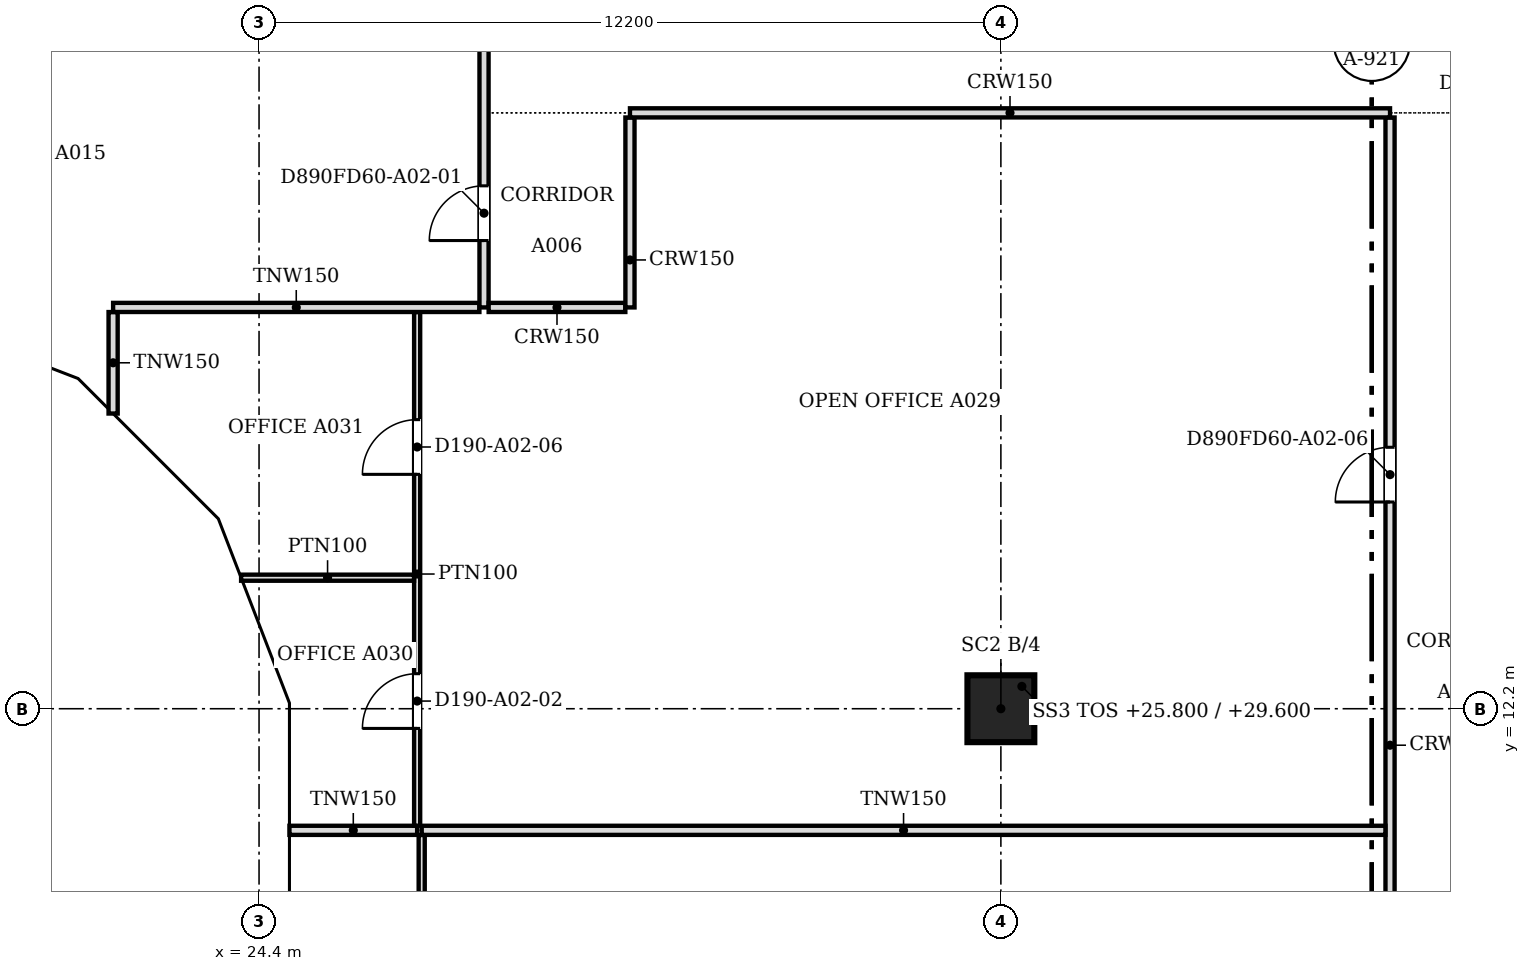
"""IFC4 building model, lengths in metres.
Left out: names, types, materials, properties, quantities, classifications, styles, units other than length and angle.
Written with IfcOpenShell. Run it as: python <this file> out.ifc"""

import sys

from ifc_helpers import new_model, si_unit, direction, frame, frame_2d, origin, origin_2d, place, context, subcontext, project, spatial, polyline, rectangle, outline, extrude, faceted_brep, source, transform, mapped, element, fill, save


model = new_model("IFC4")
c1 = context("Model", 3, precision=1e-05, world=origin(), true_north=direction((0.0, 1.0)))
c2 = subcontext(c1, "Body", "Model", "MODEL_VIEW")
j1 = project(units=[si_unit("LENGTHUNIT", "METRE"), si_unit("PLANEANGLEUNIT", "RADIAN")], contexts=[c1])
p1 = place(None, origin())
s1 = spatial("IfcSite", under=j1, at=p1, CompositionType="ELEMENT")
p2 = place(p1, origin())
s2 = spatial("IfcBuilding", under=s1, at=p2, CompositionType="ELEMENT")
p3 = place(p2, frame((0.0, 0.0, 25.8)))
s3 = spatial("IfcBuildingStorey", under=s2, at=p3, CompositionType="ELEMENT", Elevation=25.8)
p4 = place(p3, frame((36.6, 12.2, 0.0), z_axis=(0.0, 0.0, 1.0), x_axis=(1.0, 0.0, 0.0)))
e1 = element("IfcColumn", 1, at=p4, inside=s3, PredefinedType="COLUMN", context=c2, shape_type="SweptSolid", body=[
    extrude(rectangle(XDim=1.1, YDim=1.1, at=origin_2d()), origin(), (0.0, 0.0, 1.0), 3.6),
])
m1 = source(origin(), c2, "Body", "Brep", [
    faceted_brep([(3.143, -0.25, 0.064), (0.093, -0.25, 3.744), (0.093, -0.25, 0.0), (3.143, -0.25, 0.0), (0.0, 0.25, 3.743), (0.047, 0.25, 3.8), (3.196, 0.25, 0.0), (0.0, 0.25, 0.0), (0.047, 0.0, 3.8), (3.196, -0.0, 0.0)], [[[0, 1, 2, 3]], [[4, 5, 6, 7]], [[6, 5, 8, 1, 0, 9]], [[5, 4, 8]], [[7, 6, 9, 3, 2]], [[7, 2, 1, 8, 4]], [[3, 9, 0]]]),
])
p5 = place(p3, frame((18.303, 18.567, 0.0), z_axis=(0.0, 0.0, 1.0), x_axis=(0.932978940178, -0.359930961693, 0.0)))
e2 = element("IfcWall", 2, at=p5, inside=s3, PredefinedType="SOLIDWALL", context=c2, shape_type="MappedRepresentation", body=[
    mapped(m1, transform((0.0, 0.0, 0.0), scale=1.0)),
])
m2 = source(origin(), c2, "Body", "SweptSolid", [
    extrude(outline(polyline([(2.664, 0.25), (0.247, 3.167), (0.247, 0.25), (2.664, 0.25)])), frame((0.0, 0.26, 0.0), z_axis=(0.0, -1.0, 0.0), x_axis=(1.0, 0.0, 0.0)), (0.0, 0.0, 1.0), 0.52),
])
p6 = place(p5, origin())
e3 = element("IfcOpeningElement", 3, at=p6, cuts=e2, PredefinedType="OPENING", context=c2, shape_type="MappedRepresentation", body=[
    mapped(m2, transform((0.0, 0.0, 0.0), scale=1.0)),
])
m3 = source(origin(), c2, "Body", "Brep", [
    faceted_brep([(3.103, -0.25, 3.736), (0.053, -0.25, 0.064), (0.053, -0.25, 0.0), (3.103, -0.25, 0.0), (0.0, 0.25, 0.0), (3.156, 0.25, 3.8), (3.209, 0.25, 3.736), (3.209, 0.25, 0.0), (3.156, -0.0, 3.8), (0.0, 0.0, 0.0)], [[[0, 1, 2, 3]], [[4, 5, 6, 7]], [[6, 5, 8]], [[5, 4, 9, 1, 0, 8]], [[4, 7, 3, 2, 9]], [[9, 2, 1]], [[3, 7, 6, 8, 0]]]),
])
p7 = place(p3, frame((21.285, 17.417, 0.0), z_axis=(0.0, 0.0, 1.0), x_axis=(0.707106781187, -0.707106781187, 0.0)))
e4 = element("IfcWall", 4, at=p7, inside=s3, PredefinedType="SOLIDWALL", context=c2, shape_type="MappedRepresentation", body=[
    mapped(m3, transform((0.0, 0.0, 0.0), scale=1.0)),
])
m4 = source(origin(), c2, "Body", "SweptSolid", [
    extrude(outline(polyline([(2.956, 3.168), (0.533, 0.25), (2.956, 0.25), (2.956, 3.168)])), frame((0.0, 0.26, 0.0), z_axis=(0.0, -1.0, 0.0), x_axis=(1.0, 0.0, 0.0)), (0.0, 0.0, 1.0), 0.52),
])
p8 = place(p7, origin())
e5 = element("IfcOpeningElement", 5, at=p8, cuts=e4, PredefinedType="OPENING", context=c2, shape_type="MappedRepresentation", body=[
    mapped(m4, transform((0.0, 0.0, 0.0), scale=1.0)),
])
m5 = source(origin(), c2, "Body", "Brep", [
    faceted_brep([(3.156, -0.25, 0.056), (0.106, -0.25, 3.736), (0.106, -0.25, 0.0), (3.156, -0.25, 0.0), (0.0, 0.25, 3.736), (0.053, 0.25, 3.8), (3.202, 0.25, 0.0), (0.0, 0.25, 0.0), (0.053, 0.0, 3.8), (3.202, -0.0, 0.0)], [[[0, 1, 2, 3]], [[4, 5, 6, 7]], [[6, 5, 8, 1, 0, 9]], [[5, 4, 8]], [[7, 6, 9, 3, 2]], [[7, 2, 1, 8, 4]], [[3, 9, 0]]]),
])
p9 = place(p3, frame((23.497, 15.234, 0.0), z_axis=(0.0, 0.0, 1.0), x_axis=(0.359913782069, -0.932985567668, 0.0)))
e6 = element("IfcWall", 6, at=p9, inside=s3, PredefinedType="SOLIDWALL", context=c2, shape_type="MappedRepresentation", body=[
    mapped(m5, transform((0.0, 0.0, 0.0), scale=1.0)),
])
m6 = source(origin(), c2, "Body", "SweptSolid", [
    extrude(outline(polyline([(2.671, 0.25), (0.253, 3.167), (0.253, 0.25), (2.671, 0.25)])), frame((0.0, 0.26, 0.0), z_axis=(0.0, -1.0, 0.0), x_axis=(1.0, 0.0, 0.0)), (0.0, 0.0, 1.0), 0.52),
])
p10 = place(p9, origin())
e7 = element("IfcOpeningElement", 7, at=p10, cuts=e6, PredefinedType="OPENING", context=c2, shape_type="MappedRepresentation", body=[
    mapped(m6, transform((0.0, 0.0, 0.0), scale=1.0)),
])
m7 = source(origin(), c2, "Body", "Brep", [
    faceted_brep([(6.1, -0.25, 0.0), (3.096, -0.25, 3.8), (0.047, -0.25, 0.057), (0.047, -0.25, 0.0), (0.0, 0.25, 0.0), (3.096, 0.25, 3.8), (6.053, 0.25, 0.059), (6.053, 0.25, 0.0), (6.1, -0.0, 0.0), (0.0, 0.0, 0.0)], [[[0, 1, 2, 3]], [[4, 5, 6, 7]], [[6, 5, 1, 0, 8]], [[5, 4, 9, 2, 1]], [[4, 7, 8, 0, 3, 9]], [[9, 3, 2]], [[8, 7, 6]]]),
])
p11 = place(p3, frame((24.65, 12.247, 0.0), z_axis=(0.0, 0.0, 1.0), x_axis=(0.0, -1.0, 0.0)))
e8 = element("IfcWall", 8, at=p11, inside=s3, PredefinedType="SOLIDWALL", context=c2, shape_type="MappedRepresentation", body=[
    mapped(m7, transform((0.0, 0.0, 0.0), scale=1.0)),
])
m8 = source(origin(), c2, "Body", "SweptSolid", [
    extrude(outline(polyline([(5.584, 0.25), (3.094, 3.401), (0.526, 0.25), (5.584, 0.25)])), frame((0.0, 0.26, 0.0), z_axis=(0.0, -1.0, 0.0), x_axis=(1.0, 0.0, 0.0)), (0.0, 0.0, 1.0), 0.52),
])
p12 = place(p11, origin())
e9 = element("IfcOpeningElement", 9, at=p12, cuts=e8, PredefinedType="OPENING", context=c2, shape_type="MappedRepresentation", body=[
    mapped(m8, transform((0.0, 0.0, 0.0), scale=1.0)),
])
p13 = place(p2, frame((0.0, 0.0, 29.6)))
s4 = spatial("IfcBuildingStorey", under=s2, at=p13, CompositionType="ELEMENT", Elevation=29.6)
m9 = source(origin(), c2, "Body", "Brep", [
    faceted_brep([(3.096, -0.25, 7.536), (0.047, -0.25, 3.856), (0.047, -0.25, 3.744), (3.096, -0.25, 0.064), (0.0, 0.25, 3.8), (3.149, 0.25, 7.6), (3.202, 0.25, 7.536), (3.202, 0.25, 0.064), (3.149, 0.25, 0.0), (3.149, -0.0, 0.0), (3.149, -0.0, 7.6), (0.0, 0.0, 3.8)], [[[0, 1, 2, 3]], [[4, 5, 6, 7, 8]], [[8, 7, 9]], [[6, 5, 10]], [[5, 4, 11, 1, 0, 10]], [[4, 8, 9, 3, 2, 11]], [[2, 1, 11]], [[3, 9, 7, 6, 10, 0]]]),
])
p14 = place(p13, frame((18.346, 18.55, -3.8), z_axis=(0.0, 0.0, 1.0), x_axis=(0.932985567668, -0.359913782069, 0.0)))
e10 = element("IfcWall", 10, at=p14, inside=s4, PredefinedType="SOLIDWALL", context=c2, shape_type="MappedRepresentation", body=[
    mapped(m9, transform((0.0, 0.0, 0.0), scale=1.0)),
])
m10 = source(origin(), c2, "Body", "SweptSolid", [
    extrude(outline(polyline([(2.949, 6.967), (0.325, 3.8), (2.949, 0.633), (2.949, 6.967)])), frame((0.0, 0.26, 0.0), z_axis=(0.0, -1.0, 0.0), x_axis=(1.0, 0.0, 0.0)), (0.0, 0.0, 1.0), 0.52),
])
p15 = place(p14, origin())
e11 = element("IfcOpeningElement", 11, at=p15, cuts=e10, PredefinedType="OPENING", context=c2, shape_type="MappedRepresentation", body=[
    mapped(m10, transform((0.0, 0.0, 0.0), scale=1.0)),
])
m11 = source(origin(), c2, "Body", "Brep", [
    faceted_brep([(0.106, -0.25, 0.064), (3.156, -0.25, 3.736), (3.156, -0.25, 3.864), (0.106, -0.25, 7.536), (0.0, 0.25, 7.536), (0.053, 0.25, 7.6), (3.209, 0.25, 3.8), (0.053, 0.25, 0.0), (0.0, 0.25, 0.064), (3.209, -0.0, 3.8), (0.053, 0.0, 0.0), (0.053, 0.0, 7.6)], [[[0, 1, 2, 3]], [[4, 5, 6, 7, 8]], [[7, 6, 9, 1, 0, 10]], [[6, 5, 11, 3, 2, 9]], [[5, 4, 11]], [[8, 7, 10]], [[8, 10, 0, 3, 11, 4]], [[1, 9, 2]]]),
])
p16 = place(p13, frame((21.248, 17.454, -3.8), z_axis=(0.0, 0.0, 1.0), x_axis=(0.707106781187, -0.707106781187, 0.0)))
e12 = element("IfcWall", 12, at=p16, inside=s4, PredefinedType="SOLIDWALL", context=c2, shape_type="MappedRepresentation", body=[
    mapped(m11, transform((0.0, 0.0, 0.0), scale=1.0)),
])
m12 = source(origin(), c2, "Body", "SweptSolid", [
    extrude(outline(polyline([(0.253, 0.632), (2.884, 3.8), (0.253, 6.968), (0.253, 0.632)])), frame((0.0, 0.26, 0.0), z_axis=(0.0, -1.0, 0.0), x_axis=(1.0, 0.0, 0.0)), (0.0, 0.0, 1.0), 0.52),
])
p17 = place(p16, origin())
e13 = element("IfcOpeningElement", 13, at=p17, cuts=e12, PredefinedType="OPENING", context=c2, shape_type="MappedRepresentation", body=[
    mapped(m12, transform((0.0, 0.0, 0.0), scale=1.0)),
])
m13 = source(origin(), c2, "Body", "Brep", [
    faceted_brep([(3.103, -0.25, 7.544), (0.053, -0.25, 3.864), (0.053, -0.25, 3.736), (3.103, -0.25, 0.056), (0.0, 0.25, 3.8), (3.149, 0.25, 7.6), (3.196, 0.25, 7.543), (3.196, 0.25, 0.057), (3.149, 0.25, 0.0), (3.149, -0.0, 0.0), (3.149, -0.0, 7.6), (0.0, 0.0, 3.8)], [[[0, 1, 2, 3]], [[4, 5, 6, 7, 8]], [[8, 7, 9]], [[6, 5, 10]], [[5, 4, 11, 1, 0, 10]], [[4, 8, 9, 3, 2, 11]], [[2, 1, 11]], [[3, 9, 7, 6, 10, 0]]]),
])
p18 = place(p13, frame((23.517, 15.185, -3.8), z_axis=(0.0, 0.0, 1.0), x_axis=(0.359864468756, -0.933004589553, 0.0)))
e14 = element("IfcWall", 14, at=p18, inside=s4, PredefinedType="SOLIDWALL", context=c2, shape_type="MappedRepresentation", body=[
    mapped(m13, transform((0.0, 0.0, 0.0), scale=1.0)),
])
p19 = place(p18, origin())
e15 = element("IfcOpeningElement", 15, at=p19, cuts=e14, PredefinedType="OPENING", context=c2, shape_type="MappedRepresentation", body=[
    mapped(m10, transform((0.0, 0.0, 0.0), scale=1.0)),
])
m14 = source(origin(), c2, "Body", "Brep", [
    faceted_brep([(0.093, -0.25, 0.057), (3.143, -0.25, 3.8), (0.093, -0.25, 7.543), (0.0, 0.25, 7.544), (0.047, 0.25, 7.6), (3.143, 0.25, 3.8), (0.047, 0.25, 0.0), (0.0, 0.25, 0.056), (0.047, 0.0, 0.0), (0.047, 0.0, 7.6)], [[[0, 1, 2]], [[3, 4, 5, 6, 7]], [[6, 5, 1, 0, 8]], [[5, 4, 9, 2, 1]], [[4, 3, 9]], [[7, 6, 8]], [[7, 8, 0, 2, 9, 3]]]),
])
p20 = place(p13, frame((24.65, 12.293, -3.8), z_axis=(0.0, 0.0, 1.0), x_axis=(0.0, -1.0, 0.0)))
e16 = element("IfcWall", 16, at=p20, inside=s4, PredefinedType="SOLIDWALL", context=c2, shape_type="MappedRepresentation", body=[
    mapped(m14, transform((0.0, 0.0, 0.0), scale=1.0)),
])
m15 = source(origin(), c2, "Body", "SweptSolid", [
    extrude(outline(polyline([(0.247, 0.641), (2.821, 3.8), (0.247, 6.959), (0.247, 0.641)])), frame((0.0, 0.26, 0.0), z_axis=(0.0, -1.0, 0.0), x_axis=(1.0, 0.0, 0.0)), (0.0, 0.0, 1.0), 0.52),
])
p21 = place(p20, origin())
e17 = element("IfcOpeningElement", 17, at=p21, cuts=e16, PredefinedType="OPENING", context=c2, shape_type="MappedRepresentation", body=[
    mapped(m15, transform((0.0, 0.0, 0.0), scale=1.0)),
])
p22 = place(p3, frame((43.0, 0.5, 0.0), z_axis=(0.0, 0.0, 1.0), x_axis=(0.0, 1.0, 0.0)))
e18 = element("IfcWall", 18, at=p22, inside=s3, PredefinedType="PARTITIONING", context=c2, shape_type="SweptSolid", body=[
    extrude(rectangle(XDim=21.424, YDim=0.15, at=frame_2d((10.712, 0.0))), origin(), (0.0, 0.0, 1.0), 3.067),
])
m16 = source(origin(), c2, "Body", "SweptSolid", [
    extrude(rectangle(XDim=0.9, YDim=2.1, at=frame_2d((0.45, 1.05))), frame((0.0, 0.085, 0.0), z_axis=(0.0, -1.0, 0.0), x_axis=(1.0, 0.0, 0.0)), (0.0, 0.0, 1.0), 0.17),
])
p23 = place(p22, frame((6.2, 0.0, 0.0)))
e19 = element("IfcOpeningElement", 19, at=p23, cuts=e18, PredefinedType="OPENING", context=c2, shape_type="MappedRepresentation", body=[
    mapped(m16, transform((0.0, 0.0, 0.0), scale=1.0)),
])
p24 = place(p22, frame((15.1, 0.0, 0.0)))
e20 = element("IfcOpeningElement", 20, at=p24, cuts=e18, PredefinedType="OPENING", context=c2, shape_type="MappedRepresentation", body=[
    mapped(m16, transform((0.0, 0.0, 0.0), scale=1.0)),
])
p25 = place(p3, frame((27.075, 4.2, 0.0), z_axis=(0.0, 0.0, 1.0), x_axis=(0.0, 1.0, 0.0)))
e21 = element("IfcWall", 21, at=p25, inside=s3, PredefinedType="PARTITIONING", context=c2, shape_type="SweptSolid", body=[
    extrude(rectangle(XDim=5.924, YDim=0.1, at=frame_2d((2.962, 0.0))), origin(), (0.0, 0.0, 1.0), 3.067),
])
m17 = source(origin(), c2, "Body", "SweptSolid", [
    extrude(rectangle(XDim=0.9, YDim=2.1, at=frame_2d((0.45, 1.05))), frame((0.0, 0.06, 0.0), z_axis=(0.0, -1.0, 0.0), x_axis=(1.0, 0.0, 0.0)), (0.0, 0.0, 1.0), 0.12),
])
p26 = place(p25, frame((2.5, 0.0, 0.0)))
e22 = element("IfcOpeningElement", 22, at=p26, cuts=e21, PredefinedType="OPENING", context=c2, shape_type="MappedRepresentation", body=[
    mapped(m17, transform((0.0, 0.0, 0.0), scale=1.0)),
])
p27 = place(p3, frame((24.9, 10.2, 0.0), z_axis=(0.0, 0.0, 1.0), x_axis=(1.0, 0.0, 0.0)))
e23 = element("IfcWall", 23, at=p27, inside=s3, PredefinedType="PARTITIONING", context=c2, shape_type="SweptSolid", body=[
    extrude(rectangle(XDim=2.1, YDim=0.15, at=frame_2d((1.05, 0.0))), origin(), (0.0, 0.0, 1.0), 3.067),
])
p28 = place(p3, frame((27.075, 10.2, 0.0), z_axis=(0.0, 0.0, 1.0), x_axis=(1.0, 0.0, 0.0)))
e24 = element("IfcWall", 24, at=p28, inside=s3, PredefinedType="PARTITIONING", context=c2, shape_type="SweptSolid", body=[
    extrude(rectangle(XDim=15.849, YDim=0.15, at=frame_2d((7.925, 0.0))), origin(), (0.0, 0.0, 1.0), 3.067),
])
p29 = place(p3, frame((27.0, 10.276, 0.0), z_axis=(0.0, 0.0, 1.0), x_axis=(0.0, 1.0, 0.0)))
e25 = element("IfcWall", 25, at=p29, inside=s3, PredefinedType="PARTITIONING", context=c2, shape_type="SweptSolid", body=[
    extrude(rectangle(XDim=8.448, YDim=0.1, at=frame_2d((4.224, 0.0))), origin(), (0.0, 0.0, 1.0), 3.067),
])
p30 = place(p29, frame((1.6, 0.0, 0.0)))
e26 = element("IfcOpeningElement", 26, at=p30, cuts=e25, PredefinedType="OPENING", context=c2, shape_type="MappedRepresentation", body=[
    mapped(m17, transform((0.0, 0.0, 0.0), scale=1.0)),
])
p31 = place(p29, frame((5.779, 0.0, 0.0)))
e27 = element("IfcOpeningElement", 27, at=p31, cuts=e25, PredefinedType="OPENING", context=c2, shape_type="MappedRepresentation", body=[
    mapped(m17, transform((0.0, 0.0, 0.0), scale=1.0)),
])
p32 = place(p3, frame((24.105, 14.355, 0.0), z_axis=(0.0, 0.0, 1.0), x_axis=(1.0, 0.0, 0.0)))
e28 = element("IfcWall", 28, at=p32, inside=s3, PredefinedType="PARTITIONING", context=c2, shape_type="SweptSolid", body=[
    extrude(rectangle(XDim=2.844, YDim=0.1, at=frame_2d((1.422, 0.0))), origin(), (0.0, 0.0, 1.0), 3.067),
])
p33 = place(p3, frame((22.0, 17.055, 0.0), z_axis=(0.0, 0.0, 1.0), x_axis=(0.0, 1.0, 0.0)))
e29 = element("IfcWall", 29, at=p33, inside=s3, PredefinedType="PARTITIONING", context=c2, shape_type="SweptSolid", body=[
    extrude(rectangle(XDim=1.669, YDim=0.15, at=frame_2d((0.834, 0.0))), origin(), (0.0, 0.0, 1.0), 3.067),
])
p34 = place(p3, frame((22.0, 18.8, 0.0), z_axis=(0.0, 0.0, 1.0), x_axis=(1.0, 0.0, 0.0)))
e30 = element("IfcWall", 30, at=p34, inside=s3, PredefinedType="PARTITIONING", context=c2, shape_type="SweptSolid", body=[
    extrude(rectangle(XDim=6.024, YDim=0.15, at=frame_2d((3.012, 0.0))), origin(), (0.0, 0.0, 1.0), 3.067),
])
p35 = place(p3, frame((28.1, 18.8, 0.0), z_axis=(0.0, 0.0, 1.0), x_axis=(0.0, 1.0, 0.0)))
e31 = element("IfcWall", 31, at=p35, inside=s3, PredefinedType="PARTITIONING", context=c2, shape_type="SweptSolid", body=[
    extrude(rectangle(XDim=26.5, YDim=0.15, at=frame_2d((13.25, 0.0))), origin(), (0.0, 0.0, 1.0), 3.067),
])
p36 = place(p35, frame((1.1, 0.0, 0.0)))
e32 = element("IfcOpeningElement", 32, at=p36, cuts=e31, PredefinedType="OPENING", context=c2, shape_type="MappedRepresentation", body=[
    mapped(m16, transform((0.0, 0.0, 0.0), scale=1.0)),
])
m18 = source(origin(), c2, "Body", "SweptSolid", [
    extrude(rectangle(XDim=1.0, YDim=2.1, at=frame_2d((0.5, 1.05))), frame((0.0, 0.085, 0.0), z_axis=(0.0, -1.0, 0.0), x_axis=(1.0, 0.0, 0.0)), (0.0, 0.0, 1.0), 0.17),
])
p37 = place(p35, frame((23.151, 0.0, 0.0)))
e33 = element("IfcOpeningElement", 33, at=p37, cuts=e31, PredefinedType="OPENING", context=c2, shape_type="MappedRepresentation", body=[
    mapped(m18, transform((0.0, 0.0, 0.0), scale=1.0)),
])
p38 = place(p35, frame((8.2, 0.0, 0.0)))
e34 = element("IfcOpeningElement", 34, at=p38, cuts=e31, PredefinedType="OPENING", context=c2, shape_type="MappedRepresentation", body=[
    mapped(m16, transform((0.0, 0.0, 0.0), scale=1.0)),
])
p39 = place(p35, frame((15.8, 0.0, 0.0)))
e35 = element("IfcOpeningElement", 35, at=p39, cuts=e31, PredefinedType="OPENING", context=c2, shape_type="MappedRepresentation", body=[
    mapped(m18, transform((0.0, 0.0, 0.0), scale=1.0)),
])
p40 = place(p3, frame((28.176, 18.8, 0.0), z_axis=(0.0, 0.0, 1.0), x_axis=(1.0, 0.0, 0.0)))
e36 = element("IfcWall", 36, at=p40, inside=s3, PredefinedType="PARTITIONING", context=c2, shape_type="SweptSolid", body=[
    extrude(rectangle(XDim=2.248, YDim=0.15, at=frame_2d((1.124, 0.0))), origin(), (0.0, 0.0, 1.0), 3.067),
])
p41 = place(p3, frame((30.5, 18.8, 0.0), z_axis=(0.0, 0.0, 1.0), x_axis=(0.0, 1.0, 0.0)))
e37 = element("IfcWall", 37, at=p41, inside=s3, PredefinedType="PARTITIONING", context=c2, shape_type="SweptSolid", body=[
    extrude(rectangle(XDim=3.124, YDim=0.15, at=frame_2d((1.562, 0.0))), origin(), (0.0, 0.0, 1.0), 3.067),
])
p42 = place(p3, frame((30.5, 22.0, 0.0), z_axis=(0.0, 0.0, 1.0), x_axis=(1.0, 0.0, 0.0)))
e38 = element("IfcWall", 38, at=p42, inside=s3, PredefinedType="PARTITIONING", context=c2, shape_type="SweptSolid", body=[
    extrude(rectangle(XDim=12.5, YDim=0.15, at=frame_2d((6.25, 0.0))), origin(), (0.0, 0.0, 1.0), 3.067),
])
m19 = source(origin(), c2, "Body", "SweptSolid", [
    extrude(rectangle(XDim=0.9, YDim=2.1, at=frame_2d((0.45, 1.05))), frame((0.0, 0.025, 0.0), z_axis=(0.0, -1.0, 0.0), x_axis=(1.0, 0.0, 0.0)), (0.0, 0.0, 1.0), 0.05),
])
p43 = place(p36, origin())
e39 = element("IfcDoor", 39, at=p43, inside=s3, OperationType="SINGLE_SWING_LEFT", PredefinedType="DOOR", context=c2, shape_type="MappedRepresentation", body=[
    mapped(m19, transform((0.0, 0.0, 0.0), scale=1.0)),
])
fill(e32, e39)
p44 = place(p30, origin())
e40 = element("IfcDoor", 40, at=p44, inside=s3, OperationType="SINGLE_SWING_LEFT", PredefinedType="DOOR", context=c2, shape_type="MappedRepresentation", body=[
    mapped(m19, transform((0.0, 0.0, 0.0), scale=1.0)),
])
fill(e26, e40)
p45 = place(p31, origin())
e41 = element("IfcDoor", 41, at=p45, inside=s3, OperationType="SINGLE_SWING_LEFT", PredefinedType="DOOR", context=c2, shape_type="MappedRepresentation", body=[
    mapped(m19, transform((0.0, 0.0, 0.0), scale=1.0)),
])
fill(e27, e41)
p46 = place(p24, origin())
e42 = element("IfcDoor", 42, at=p46, inside=s3, OperationType="SINGLE_SWING_LEFT", PredefinedType="DOOR", context=c2, shape_type="MappedRepresentation", body=[
    mapped(m19, transform((0.0, 0.0, 0.0), scale=1.0)),
])
fill(e20, e42)
save(model, sys.argv[1])
